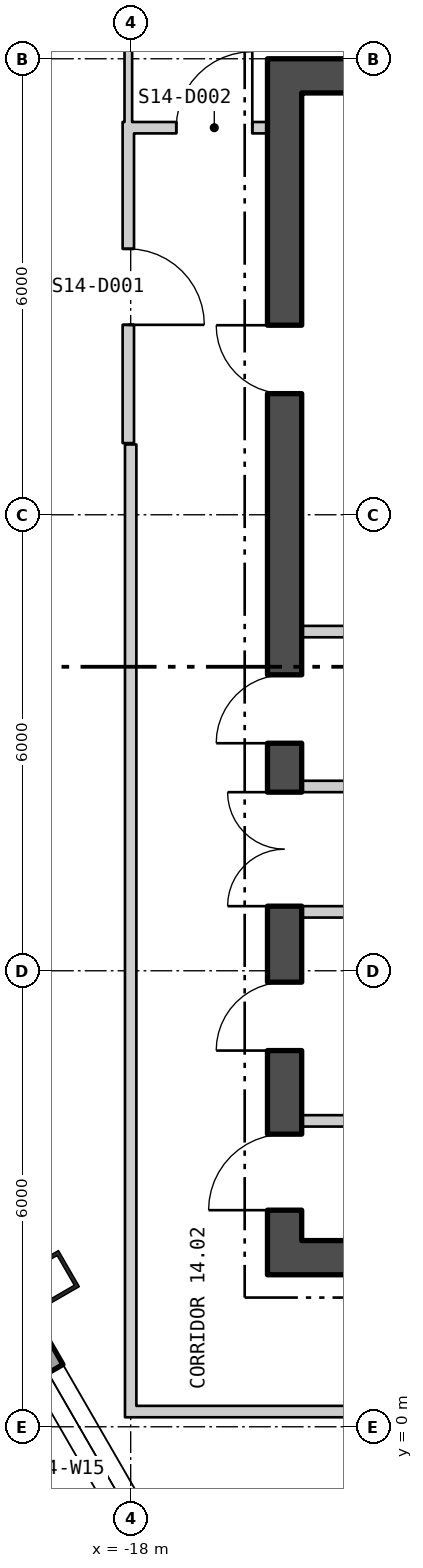
"""IFC4 building model, lengths in metres.
Left out: names, types, materials, properties, quantities, classifications, styles, units other than length and angle.
Written with IfcOpenShell. Run it as: python <this file> out.ifc"""

import sys

from ifc_helpers import new_model, si_unit, direction, frame, frame_2d, origin, origin_2d, place, context, subcontext, project, spatial, polyline, rectangle, hollow_rectangle, outline, extrude, element, fill, save


model = new_model("IFC4")
c1 = context("Model", 3, precision=1e-05, world=origin(), true_north=direction((0.0, 1.0)))
c2 = subcontext(c1, "Body", "Model", "MODEL_VIEW")
j1 = project(units=[si_unit("LENGTHUNIT", "METRE"), si_unit("PLANEANGLEUNIT", "RADIAN")], contexts=[c1])
p1 = place(None, origin())
s1 = spatial("IfcSite", under=j1, at=p1, CompositionType="ELEMENT")
p2 = place(p1, origin())
s2 = spatial("IfcBuilding", under=s1, at=p2, CompositionType="ELEMENT")
p3 = place(p2, frame((0.0, 0.0, 192.6)))
s3 = spatial("IfcBuildingStorey", under=s2, at=p3, CompositionType="ELEMENT", Elevation=192.6)
p4 = place(p3, frame((-19.115, 1.907, 0.0), z_axis=(0.0, 0.0, 1.0), x_axis=(0.5, -0.866025403784, 0.0)))
e1 = element("IfcColumn", 1, at=p4, inside=s3, PredefinedType="COLUMN", context=c2, shape_type="SweptSolid", body=[
    extrude(hollow_rectangle(XDim=0.55, YDim=0.7, WallThickness=0.05, at=origin_2d()), origin(), (0.0, 0.0, 1.0), 3.9),
])
p5 = place(p3, frame((-26.54, 13.618, -0.18), z_axis=(0.0, 0.0, 1.0), x_axis=(0.499999764979, -0.866025539474, 0.0)))
e2 = element("IfcWall", 2, at=p5, inside=s3, PredefinedType="SOLIDWALL", context=c2, shape_type="SweptSolid", body=[
    extrude(outline(polyline([(-0.13, -0.225), (45.87, -0.225), (45.61, 0.225), (0.13, 0.225), (-0.13, -0.225)])), origin(), (0.0, 0.0, 1.0), 3.68),
])
p6 = place(p5, frame((1.424, 0.0, 1.08)))
e3 = element("IfcOpeningElement", 3, at=p6, cuts=e2, PredefinedType="OPENING", context=c2, shape_type="SweptSolid", body=[
    extrude(rectangle(XDim=2.4, YDim=2.0, at=frame_2d((1.2, 1.0))), frame((0.0, 0.235, 0.0), z_axis=(0.0, -1.0, 0.0), x_axis=(1.0, 0.0, 0.0)), (0.0, 0.0, 1.0), 0.47),
])
p7 = place(p5, frame((5.893, 0.0, 1.08)))
e4 = element("IfcOpeningElement", 4, at=p7, cuts=e2, PredefinedType="OPENING", context=c2, shape_type="SweptSolid", body=[
    extrude(rectangle(XDim=2.4, YDim=2.0, at=frame_2d((1.2, 1.0))), frame((0.0, 0.235, 0.0), z_axis=(0.0, -1.0, 0.0), x_axis=(1.0, 0.0, 0.0)), (0.0, 0.0, 1.0), 0.47),
])
p8 = place(p5, frame((10.401, 0.0, 1.08)))
e5 = element("IfcOpeningElement", 5, at=p8, cuts=e2, PredefinedType="OPENING", context=c2, shape_type="SweptSolid", body=[
    extrude(rectangle(XDim=2.4, YDim=2.0, at=frame_2d((1.2, 1.0))), frame((0.0, 0.235, 0.0), z_axis=(0.0, -1.0, 0.0), x_axis=(1.0, 0.0, 0.0)), (0.0, 0.0, 1.0), 0.47),
])
p9 = place(p5, frame((14.909, 0.0, 1.08)))
e6 = element("IfcOpeningElement", 6, at=p9, cuts=e2, PredefinedType="OPENING", context=c2, shape_type="SweptSolid", body=[
    extrude(rectangle(XDim=2.4, YDim=2.0, at=frame_2d((1.2, 1.0))), frame((0.0, 0.235, 0.0), z_axis=(0.0, -1.0, 0.0), x_axis=(1.0, 0.0, 0.0)), (0.0, 0.0, 1.0), 0.47),
])
p10 = place(p5, frame((19.416, 0.0, 1.08)))
e7 = element("IfcOpeningElement", 7, at=p10, cuts=e2, PredefinedType="OPENING", context=c2, shape_type="SweptSolid", body=[
    extrude(rectangle(XDim=2.4, YDim=2.0, at=frame_2d((1.2, 1.0))), frame((0.0, 0.235, 0.0), z_axis=(0.0, -1.0, 0.0), x_axis=(1.0, 0.0, 0.0)), (0.0, 0.0, 1.0), 0.47),
])
p11 = place(p5, frame((23.924, 0.0, 1.08)))
e8 = element("IfcOpeningElement", 8, at=p11, cuts=e2, PredefinedType="OPENING", context=c2, shape_type="SweptSolid", body=[
    extrude(rectangle(XDim=2.4, YDim=2.0, at=frame_2d((1.2, 1.0))), frame((0.0, 0.235, 0.0), z_axis=(0.0, -1.0, 0.0), x_axis=(1.0, 0.0, 0.0)), (0.0, 0.0, 1.0), 0.47),
])
p12 = place(p5, frame((28.431, 0.0, 1.08)))
e9 = element("IfcOpeningElement", 9, at=p12, cuts=e2, PredefinedType="OPENING", context=c2, shape_type="SweptSolid", body=[
    extrude(rectangle(XDim=2.4, YDim=2.0, at=frame_2d((1.2, 1.0))), frame((0.0, 0.235, 0.0), z_axis=(0.0, -1.0, 0.0), x_axis=(1.0, 0.0, 0.0)), (0.0, 0.0, 1.0), 0.47),
])
p13 = place(p5, frame((32.939, 0.0, 1.08)))
e10 = element("IfcOpeningElement", 10, at=p13, cuts=e2, PredefinedType="OPENING", context=c2, shape_type="SweptSolid", body=[
    extrude(rectangle(XDim=2.4, YDim=2.0, at=frame_2d((1.2, 1.0))), frame((0.0, 0.235, 0.0), z_axis=(0.0, -1.0, 0.0), x_axis=(1.0, 0.0, 0.0)), (0.0, 0.0, 1.0), 0.47),
])
p14 = place(p5, frame((41.916, 0.0, 1.08)))
e11 = element("IfcOpeningElement", 11, at=p14, cuts=e2, PredefinedType="OPENING", context=c2, shape_type="SweptSolid", body=[
    extrude(rectangle(XDim=2.4, YDim=2.0, at=frame_2d((1.2, 1.0))), frame((0.0, 0.235, 0.0), z_axis=(0.0, -1.0, 0.0), x_axis=(1.0, 0.0, 0.0)), (0.0, 0.0, 1.0), 0.47),
])
p15 = place(p3, frame((-16.2, 2.225, 0.0), z_axis=(0.0, 0.0, 1.0), x_axis=(1.0, 0.0, 0.0)))
e12 = element("IfcWall", 12, at=p15, inside=s3, PredefinedType="SHEAR", context=c2, shape_type="SweptSolid", body=[
    extrude(rectangle(XDim=32.4, YDim=0.45, at=frame_2d((16.2, 0.0))), origin(), (0.0, 0.0, 1.0), 3.7),
])
p16 = place(p15, frame((10.7, 0.0, 0.0)))
e13 = element("IfcOpeningElement", 13, at=p16, cuts=e12, PredefinedType="OPENING", context=c2, shape_type="SweptSolid", body=[
    extrude(rectangle(XDim=1.8, YDim=2.4, at=frame_2d((0.9, 1.2))), frame((0.0, 0.235, 0.0), z_axis=(0.0, -1.0, 0.0), x_axis=(1.0, 0.0, 0.0)), (0.0, 0.0, 1.0), 0.47),
])
p17 = place(p15, frame((20.7, 0.0, 0.0)))
e14 = element("IfcOpeningElement", 14, at=p17, cuts=e12, PredefinedType="OPENING", context=c2, shape_type="SweptSolid", body=[
    extrude(rectangle(XDim=1.8, YDim=2.4, at=frame_2d((0.9, 1.2))), frame((0.0, 0.235, 0.0), z_axis=(0.0, -1.0, 0.0), x_axis=(1.0, 0.0, 0.0)), (0.0, 0.0, 1.0), 0.47),
])
p18 = place(p3, frame((-16.2, 17.775, 0.0), z_axis=(0.0, 0.0, 1.0), x_axis=(1.0, 0.0, 0.0)))
e15 = element("IfcWall", 15, at=p18, inside=s3, PredefinedType="SHEAR", context=c2, shape_type="SweptSolid", body=[
    extrude(rectangle(XDim=32.4, YDim=0.45, at=frame_2d((16.2, 0.0))), origin(), (0.0, 0.0, 1.0), 3.7),
])
p19 = place(p3, frame((-15.975, 2.45, 0.0), z_axis=(0.0, 0.0, 1.0), x_axis=(0.0, 1.0, 0.0)))
e16 = element("IfcWall", 16, at=p19, inside=s3, PredefinedType="SHEAR", context=c2, shape_type="SweptSolid", body=[
    extrude(rectangle(XDim=15.1, YDim=0.45, at=frame_2d((7.55, 0.0))), origin(), (0.0, 0.0, 1.0), 3.7),
])
p20 = place(p19, frame((4.4, 0.0, 0.0)))
e17 = element("IfcOpeningElement", 17, at=p20, cuts=e16, PredefinedType="OPENING", context=c2, shape_type="SweptSolid", body=[
    extrude(rectangle(XDim=1.5, YDim=2.1, at=frame_2d((0.75, 1.05))), frame((0.0, 0.235, 0.0), z_axis=(0.0, -1.0, 0.0), x_axis=(1.0, 0.0, 0.0)), (0.0, 0.0, 1.0), 0.47),
])
p21 = place(p19, frame((0.4, 0.0, 0.0)))
e18 = element("IfcOpeningElement", 18, at=p21, cuts=e16, PredefinedType="OPENING", context=c2, shape_type="SweptSolid", body=[
    extrude(rectangle(XDim=1.0, YDim=2.1, at=frame_2d((0.5, 1.05))), frame((0.0, 0.235, 0.0), z_axis=(0.0, -1.0, 0.0), x_axis=(1.0, 0.0, 0.0)), (0.0, 0.0, 1.0), 0.47),
])
p22 = place(p19, frame((2.5, 0.0, 0.0)))
e19 = element("IfcOpeningElement", 19, at=p22, cuts=e16, PredefinedType="OPENING", context=c2, shape_type="SweptSolid", body=[
    extrude(rectangle(XDim=0.9, YDim=2.1, at=frame_2d((0.45, 1.05))), frame((0.0, 0.235, 0.0), z_axis=(0.0, -1.0, 0.0), x_axis=(1.0, 0.0, 0.0)), (0.0, 0.0, 1.0), 0.47),
])
p23 = place(p19, frame((6.544, 0.0, 0.0)))
e20 = element("IfcOpeningElement", 20, at=p23, cuts=e16, PredefinedType="OPENING", context=c2, shape_type="SweptSolid", body=[
    extrude(rectangle(XDim=0.9, YDim=2.1, at=frame_2d((0.45, 1.05))), frame((0.0, 0.235, 0.0), z_axis=(0.0, -1.0, 0.0), x_axis=(1.0, 0.0, 0.0)), (0.0, 0.0, 1.0), 0.47),
])
p24 = place(p19, frame((11.144, 0.0, 0.0)))
e21 = element("IfcOpeningElement", 21, at=p24, cuts=e16, PredefinedType="OPENING", context=c2, shape_type="SweptSolid", body=[
    extrude(rectangle(XDim=0.9, YDim=2.1, at=frame_2d((0.45, 1.05))), frame((0.0, 0.235, 0.0), z_axis=(0.0, -1.0, 0.0), x_axis=(1.0, 0.0, 0.0)), (0.0, 0.0, 1.0), 0.47),
])
for number, where, z_axis, x_axis in (
    (22, (-15.75, 6.775, 0.0), (0.0, 0.0, 1.0), (1.0, 0.0, 0.0)),
    (23, (-15.75, 8.425, 0.0), (0.0, 0.0, 1.0), (1.0, 0.0, 0.0)),
    (24, (-15.75, 4.025, 0.0), (0.0, 0.0, 1.0), (1.0, 0.0, 0.0)),
    (25, (-15.75, 10.463, 0.0), (0.0, 0.0, 1.0), (1.0, 0.0, 0.0)),
):
    element("IfcWall", number, at=place(p3, frame(where, z_axis=z_axis, x_axis=x_axis)), inside=s3, PredefinedType="PARTITIONING", context=c2, shape_type="SweptSolid", body=[
        extrude(rectangle(XDim=1.25, YDim=0.15, at=frame_2d((0.625, 0.0))), origin(), (0.0, 0.0, 1.0), 3.7),
    ])
p25 = place(p3, frame((-18.031, 12.943, 0.0), z_axis=(0.0, 0.0, 1.0), x_axis=(0.0, 1.0, 0.0)))
e26 = element("IfcWall", 26, at=p25, inside=s3, PredefinedType="PARTITIONING", context=c2, shape_type="SweptSolid", body=[
    extrude(rectangle(XDim=4.225, YDim=0.15, at=frame_2d((2.112, 0.0))), origin(), (0.0, 0.0, 1.0), 3.7),
])
p26 = place(p25, frame((1.556, 0.0, 0.0)))
e27 = element("IfcOpeningElement", 27, at=p26, cuts=e26, PredefinedType="OPENING", context=c2, shape_type="SweptSolid", body=[
    extrude(rectangle(XDim=1.0, YDim=2.1, at=frame_2d((0.5, 1.05))), frame((0.0, 0.085, 0.0), z_axis=(0.0, -1.0, 0.0), x_axis=(1.0, 0.0, 0.0)), (0.0, 0.0, 1.0), 0.17),
])
p27 = place(p3, frame((-18.031, 17.168, 0.0), z_axis=(0.0, 0.0, 1.0), x_axis=(0.0, 1.0, 0.0)))
e28 = element("IfcWall", 28, at=p27, inside=s3, PredefinedType="PARTITIONING", context=c2, shape_type="SweptSolid", body=[
    extrude(rectangle(XDim=2.132, YDim=0.1, at=frame_2d((1.066, 0.0))), origin(), (0.0, 0.0, 1.0), 3.7),
])
p28 = place(p3, frame((-18.0, 0.125, 0.0), z_axis=(0.0, 0.0, 1.0), x_axis=(0.0, 1.0, 0.0)))
e29 = element("IfcWall", 29, at=p28, inside=s3, PredefinedType="PARTITIONING", context=c2, shape_type="SweptSolid", body=[
    extrude(rectangle(XDim=12.8, YDim=0.15, at=frame_2d((6.4, 0.0))), origin(), (0.0, 0.0, 1.0), 3.7),
])
p29 = place(p3, frame((-17.956, 17.093, 0.0), z_axis=(0.0, 0.0, 1.0), x_axis=(1.0, 0.0, 0.0)))
e30 = element("IfcWall", 30, at=p29, inside=s3, PredefinedType="PARTITIONING", context=c2, shape_type="SweptSolid", body=[
    extrude(rectangle(XDim=1.756, YDim=0.15, at=frame_2d((0.878, 0.0))), origin(), (0.0, 0.0, 1.0), 3.7),
])
p30 = place(p29, frame((0.556, 0.0, 0.0)))
e31 = element("IfcOpeningElement", 31, at=p30, cuts=e30, PredefinedType="OPENING", context=c2, shape_type="SweptSolid", body=[
    extrude(rectangle(XDim=1.0, YDim=2.1, at=frame_2d((0.5, 1.05))), frame((0.0, 0.085, 0.0), z_axis=(0.0, -1.0, 0.0), x_axis=(1.0, 0.0, 0.0)), (0.0, 0.0, 1.0), 0.17),
])
p31 = place(p3, frame((-17.925, 0.2, 0.0), z_axis=(0.0, 0.0, 1.0), x_axis=(1.0, 0.0, 0.0)))
e32 = element("IfcWall", 32, at=p31, inside=s3, PredefinedType="PARTITIONING", context=c2, shape_type="SweptSolid", body=[
    extrude(rectangle(XDim=10.95, YDim=0.15, at=frame_2d((5.475, 0.0))), origin(), (0.0, 0.0, 1.0), 3.7),
])
p32 = place(p31, frame((9.75, 0.0, 0.0)))
e33 = element("IfcOpeningElement", 33, at=p32, cuts=e32, PredefinedType="OPENING", context=c2, shape_type="SweptSolid", body=[
    extrude(rectangle(XDim=1.0, YDim=2.1, at=frame_2d((0.5, 1.05))), frame((0.0, 0.085, 0.0), z_axis=(0.0, -1.0, 0.0), x_axis=(1.0, 0.0, 0.0)), (0.0, 0.0, 1.0), 0.17),
])
p33 = place(p9, origin())
e34 = element("IfcWindow", 34, at=p33, inside=s3, PartitioningType="SINGLE_PANEL", PredefinedType="WINDOW", context=c2, shape_type="SweptSolid", body=[
    extrude(rectangle(XDim=2.4, YDim=2.0, at=frame_2d((1.2, 1.0))), frame((0.0, 0.105, 0.0), z_axis=(0.0, -1.0, 0.0), x_axis=(1.0, 0.0, 0.0)), (0.0, 0.0, 1.0), 0.06),
])
fill(e6, e34)
p34 = place(p20, origin())
e35 = element("IfcDoor", 35, at=p34, inside=s3, OperationType="DOUBLE_DOOR_SINGLE_SWING", PredefinedType="DOOR", context=c2, shape_type="SweptSolid", body=[
    extrude(rectangle(XDim=1.5, YDim=2.1, at=frame_2d((0.75, 1.05))), frame((0.0, 0.025, 0.0), z_axis=(0.0, -1.0, 0.0), x_axis=(1.0, 0.0, 0.0)), (0.0, 0.0, 1.0), 0.05),
])
fill(e17, e35)
p35 = place(p21, origin())
e36 = element("IfcDoor", 36, at=p35, inside=s3, OperationType="SINGLE_SWING_RIGHT", PredefinedType="DOOR", context=c2, shape_type="SweptSolid", body=[
    extrude(rectangle(XDim=1.0, YDim=2.1, at=frame_2d((0.5, 1.05))), frame((0.0, 0.025, 0.0), z_axis=(0.0, -1.0, 0.0), x_axis=(1.0, 0.0, 0.0)), (0.0, 0.0, 1.0), 0.05),
])
fill(e18, e36)
p36 = place(p22, origin())
e37 = element("IfcDoor", 37, at=p36, inside=s3, OperationType="SINGLE_SWING_RIGHT", PredefinedType="DOOR", context=c2, shape_type="SweptSolid", body=[
    extrude(rectangle(XDim=0.9, YDim=2.1, at=frame_2d((0.45, 1.05))), frame((0.0, 0.025, 0.0), z_axis=(0.0, -1.0, 0.0), x_axis=(1.0, 0.0, 0.0)), (0.0, 0.0, 1.0), 0.05),
])
fill(e19, e37)
p37 = place(p23, origin())
e38 = element("IfcDoor", 38, at=p37, inside=s3, OperationType="SINGLE_SWING_RIGHT", PredefinedType="DOOR", context=c2, shape_type="SweptSolid", body=[
    extrude(rectangle(XDim=0.9, YDim=2.1, at=frame_2d((0.45, 1.05))), frame((0.0, 0.025, 0.0), z_axis=(0.0, -1.0, 0.0), x_axis=(1.0, 0.0, 0.0)), (0.0, 0.0, 1.0), 0.05),
])
fill(e20, e38)
p38 = place(p24, origin())
e39 = element("IfcDoor", 39, at=p38, inside=s3, OperationType="SINGLE_SWING_LEFT", PredefinedType="DOOR", context=c2, shape_type="SweptSolid", body=[
    extrude(rectangle(XDim=0.9, YDim=2.1, at=frame_2d((0.45, 1.05))), frame((0.0, 0.025, 0.0), z_axis=(0.0, -1.0, 0.0), x_axis=(1.0, 0.0, 0.0)), (0.0, 0.0, 1.0), 0.05),
])
fill(e21, e39)
p39 = place(p26, origin())
e40 = element("IfcDoor", 40, at=p39, inside=s3, OperationType="SINGLE_SWING_LEFT", PredefinedType="DOOR", context=c2, shape_type="SweptSolid", body=[
    extrude(rectangle(XDim=1.0, YDim=2.1, at=frame_2d((0.5, 1.05))), frame((0.0, 0.025, 0.0), z_axis=(0.0, -1.0, 0.0), x_axis=(1.0, 0.0, 0.0)), (0.0, 0.0, 1.0), 0.05),
])
fill(e27, e40)
p40 = place(p30, origin())
e41 = element("IfcDoor", 41, at=p40, inside=s3, OperationType="SINGLE_SWING_LEFT", PredefinedType="DOOR", context=c2, shape_type="SweptSolid", body=[
    extrude(rectangle(XDim=1.0, YDim=2.1, at=frame_2d((0.5, 1.05))), frame((0.0, 0.025, 0.0), z_axis=(0.0, -1.0, 0.0), x_axis=(1.0, 0.0, 0.0)), (0.0, 0.0, 1.0), 0.05),
])
fill(e31, e41)
save(model, sys.argv[1])
